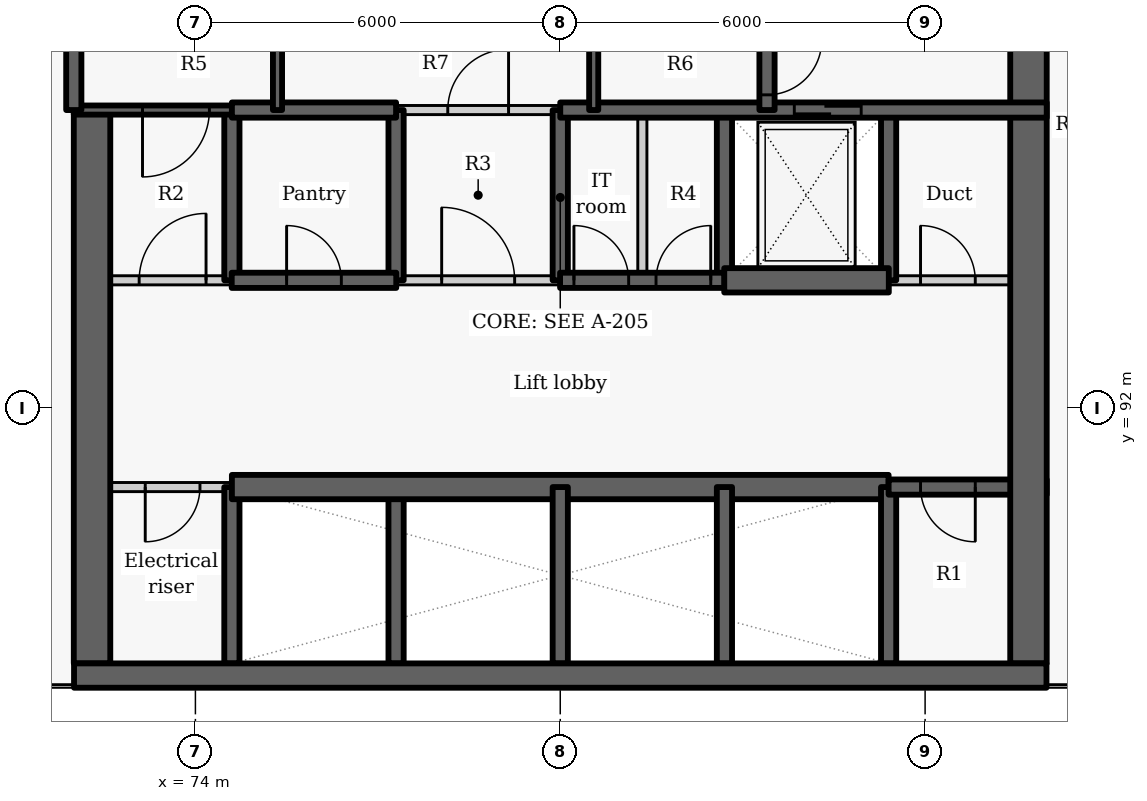
"""IFC4 building model, lengths in metres.
Left out: names, types, materials, properties, quantities, classifications, styles, units other than length and angle.
Written with IfcOpenShell. Run it as: python <this file> out.ifc"""

import sys

from ifc_helpers import new_model, si_unit, direction, frame, frame_2d, origin, place, context, subcontext, project, spatial, rectangle, extrude, element, fill, save


model = new_model("IFC4")
c1 = context("Model", 3, precision=1e-05, world=origin(), true_north=direction((0.0, 1.0)))
c2 = subcontext(c1, "Body", "Model", "MODEL_VIEW")
j1 = project(units=[si_unit("LENGTHUNIT", "METRE"), si_unit("PLANEANGLEUNIT", "RADIAN")], contexts=[c1])
p1 = place(None, origin())
s1 = spatial("IfcSite", under=j1, at=p1, CompositionType="ELEMENT")
p2 = place(p1, origin())
s2 = spatial("IfcBuilding", under=s1, at=p2, CompositionType="ELEMENT")
p3 = place(p2, frame((0.0, 0.0, 19.8)))
s3 = spatial("IfcBuildingStorey", under=s2, at=p3, CompositionType="ELEMENT", Elevation=19.8)
p4 = place(p3, frame((74.6, 87.8, -0.3), z_axis=(0.0, 0.0, 1.0), x_axis=(0.0, 1.0, 0.0)))
e1 = element("IfcWall", 1, at=p4, inside=s3, PredefinedType="SHEAR", context=c2, shape_type="SweptSolid", body=[
    extrude(rectangle(XDim=2.9, YDim=0.25, at=frame_2d((1.45, 0.0))), origin(), (0.0, 0.0, 1.0), 4.2),
])
p5 = place(p3, frame((74.6, 94.1, -0.3), z_axis=(0.0, 0.0, 1.0), x_axis=(0.0, 1.0, 0.0)))
e2 = element("IfcWall", 2, at=p5, inside=s3, PredefinedType="SHEAR", context=c2, shape_type="SweptSolid", body=[
    extrude(rectangle(XDim=2.8, YDim=0.25, at=frame_2d((1.4, 0.0))), origin(), (0.0, 0.0, 1.0), 4.2),
])
p6 = place(p3, frame((74.6, 90.7, 0.0), z_axis=(0.0, 0.0, 1.0), x_axis=(-1.0, 0.0, 0.0)))
e3 = element("IfcWall", 3, at=p6, inside=s3, PredefinedType="PARTITIONING", context=c2, shape_type="SweptSolid", body=[
    extrude(rectangle(XDim=2.6, YDim=0.15, at=frame_2d((1.3, 0.0))), origin(), (0.0, 0.0, 1.0), 3.9),
])
p7 = place(p6, frame((0.525, 0.0, 0.0)))
e4 = element("IfcOpeningElement", 4, at=p7, cuts=e3, PredefinedType="OPENING", context=c2, shape_type="SweptSolid", body=[
    extrude(rectangle(XDim=0.9, YDim=2.1, at=frame_2d((0.45, 1.05))), frame((0.0, 0.085, 0.0), z_axis=(0.0, -1.0, 0.0), x_axis=(1.0, 0.0, 0.0)), (0.0, 0.0, 1.0), 0.17),
])
p8 = place(p3, frame((72.3, 87.8, -0.3), z_axis=(0.0, 0.0, 1.0), x_axis=(0.0, 1.0, 0.0)))
e5 = element("IfcWall", 5, at=p8, inside=s3, PredefinedType="SHEAR", context=c2, shape_type="SweptSolid", body=[
    extrude(rectangle(XDim=9.1, YDim=0.6, at=frame_2d((4.55, 0.0))), origin(), (0.0, 0.0, 1.0), 4.2),
])
p9 = place(p3, frame((77.3, 87.8, -0.3), z_axis=(0.0, 0.0, 1.0), x_axis=(0.0, 1.0, 0.0)))
e6 = element("IfcWall", 6, at=p9, inside=s3, PredefinedType="SHEAR", context=c2, shape_type="SweptSolid", body=[
    extrude(rectangle(XDim=2.9, YDim=0.25, at=frame_2d((1.45, 0.0))), origin(), (0.0, 0.0, 1.0), 4.2),
])
p10 = place(p3, frame((77.3, 94.1, -0.3), z_axis=(0.0, 0.0, 1.0), x_axis=(0.0, 1.0, 0.0)))
e7 = element("IfcWall", 7, at=p10, inside=s3, PredefinedType="SHEAR", context=c2, shape_type="SweptSolid", body=[
    extrude(rectangle(XDim=2.8, YDim=0.25, at=frame_2d((1.4, 0.0))), origin(), (0.0, 0.0, 1.0), 4.2),
])
p11 = place(p3, frame((74.6, 90.7, -0.3), z_axis=(0.0, 0.0, 1.0), x_axis=(1.0, 0.0, 0.0)))
e8 = element("IfcWall", 8, at=p11, inside=s3, PredefinedType="SHEAR", context=c2, shape_type="SweptSolid", body=[
    extrude(rectangle(XDim=10.8, YDim=0.4, at=frame_2d((5.4, 0.0))), origin(), (0.0, 0.0, 1.0), 4.2),
])
p12 = place(p3, frame((80.0, 87.8, -0.3), z_axis=(0.0, 0.0, 1.0), x_axis=(0.0, 1.0, 0.0)))
e9 = element("IfcWall", 9, at=p12, inside=s3, PredefinedType="SHEAR", context=c2, shape_type="SweptSolid", body=[
    extrude(rectangle(XDim=2.9, YDim=0.25, at=frame_2d((1.45, 0.0))), origin(), (0.0, 0.0, 1.0), 4.2),
])
p13 = place(p3, frame((80.0, 94.1, -0.3), z_axis=(0.0, 0.0, 1.0), x_axis=(0.0, 1.0, 0.0)))
e10 = element("IfcWall", 10, at=p13, inside=s3, PredefinedType="SHEAR", context=c2, shape_type="SweptSolid", body=[
    extrude(rectangle(XDim=2.8, YDim=0.25, at=frame_2d((1.4, 0.0))), origin(), (0.0, 0.0, 1.0), 4.2),
])
p14 = place(p3, frame((82.7, 87.8, -0.3), z_axis=(0.0, 0.0, 1.0), x_axis=(0.0, 1.0, 0.0)))
e11 = element("IfcWall", 11, at=p14, inside=s3, PredefinedType="SHEAR", context=c2, shape_type="SweptSolid", body=[
    extrude(rectangle(XDim=2.9, YDim=0.25, at=frame_2d((1.45, 0.0))), origin(), (0.0, 0.0, 1.0), 4.2),
])
p15 = place(p3, frame((82.7, 94.1, -0.3), z_axis=(0.0, 0.0, 1.0), x_axis=(0.0, 1.0, 0.0)))
e12 = element("IfcWall", 12, at=p15, inside=s3, PredefinedType="SHEAR", context=c2, shape_type="SweptSolid", body=[
    extrude(rectangle(XDim=2.8, YDim=0.25, at=frame_2d((1.4, 0.0))), origin(), (0.0, 0.0, 1.0), 4.2),
])
p16 = place(p3, frame((85.4, 87.8, -0.3), z_axis=(0.0, 0.0, 1.0), x_axis=(0.0, 1.0, 0.0)))
e13 = element("IfcWall", 13, at=p16, inside=s3, PredefinedType="SHEAR", context=c2, shape_type="SweptSolid", body=[
    extrude(rectangle(XDim=2.9, YDim=0.25, at=frame_2d((1.45, 0.0))), origin(), (0.0, 0.0, 1.0), 4.2),
])
p17 = place(p3, frame((85.4, 94.1, -0.3), z_axis=(0.0, 0.0, 1.0), x_axis=(0.0, 1.0, 0.0)))
e14 = element("IfcWall", 14, at=p17, inside=s3, PredefinedType="SHEAR", context=c2, shape_type="SweptSolid", body=[
    extrude(rectangle(XDim=2.8, YDim=0.25, at=frame_2d((1.4, 0.0))), origin(), (0.0, 0.0, 1.0), 4.2),
])
p18 = place(p3, frame((88.0, 90.7, -0.3), z_axis=(0.0, 0.0, 1.0), x_axis=(-1.0, 0.0, 0.0)))
e15 = element("IfcWall", 15, at=p18, inside=s3, PredefinedType="SHEAR", context=c2, shape_type="SweptSolid", body=[
    extrude(rectangle(XDim=2.6, YDim=0.25, at=frame_2d((1.3, 0.0))), origin(), (0.0, 0.0, 1.0), 4.2),
])
p19 = place(p18, frame((1.175, 0.0, 0.3)))
e16 = element("IfcOpeningElement", 16, at=p19, cuts=e15, PredefinedType="OPENING", context=c2, shape_type="SweptSolid", body=[
    extrude(rectangle(XDim=0.9, YDim=2.1, at=frame_2d((0.45, 1.05))), frame((0.0, 0.135, 0.0), z_axis=(0.0, -1.0, 0.0), x_axis=(1.0, 0.0, 0.0)), (0.0, 0.0, 1.0), 0.27),
])
p20 = place(p3, frame((87.7, 103.4, -0.3), z_axis=(0.0, 0.0, 1.0), x_axis=(0.0, -1.0, 0.0)))
e17 = element("IfcWall", 17, at=p20, inside=s3, PredefinedType="SHEAR", context=c2, shape_type="SweptSolid", body=[
    extrude(rectangle(XDim=15.6, YDim=0.6, at=frame_2d((7.8, 0.0))), origin(), (0.0, 0.0, 1.0), 4.2),
])
p21 = place(p20, frame((2.7, 0.0, 0.3)))
e18 = element("IfcOpeningElement", 18, at=p21, cuts=e17, PredefinedType="OPENING", context=c2, shape_type="SweptSolid", body=[
    extrude(rectangle(XDim=1.1, YDim=2.1, at=frame_2d((0.55, 1.05))), frame((0.0, 0.31, 0.0), z_axis=(0.0, -1.0, 0.0), x_axis=(1.0, 0.0, 0.0)), (0.0, 0.0, 1.0), 0.62),
])
p22 = place(p3, frame((72.0, 94.1, 0.0), z_axis=(0.0, 0.0, 1.0), x_axis=(1.0, 0.0, 0.0)))
e19 = element("IfcWall", 19, at=p22, inside=s3, PredefinedType="PARTITIONING", context=c2, shape_type="SweptSolid", body=[
    extrude(rectangle(XDim=2.603, YDim=0.15, at=frame_2d((1.302, 0.0))), origin(), (0.0, 0.0, 1.0), 3.9),
])
p23 = place(p22, frame((1.075, 0.0, 0.0)))
e20 = element("IfcOpeningElement", 20, at=p23, cuts=e19, PredefinedType="OPENING", context=c2, shape_type="SweptSolid", body=[
    extrude(rectangle(XDim=1.1, YDim=2.1, at=frame_2d((0.55, 1.05))), frame((0.0, 0.085, 0.0), z_axis=(0.0, -1.0, 0.0), x_axis=(1.0, 0.0, 0.0)), (0.0, 0.0, 1.0), 0.17),
])
p24 = place(p3, frame((77.297, 94.1, 0.0), z_axis=(0.0, 0.0, 1.0), x_axis=(1.0, 0.0, 0.0)))
e21 = element("IfcWall", 21, at=p24, inside=s3, PredefinedType="PARTITIONING", context=c2, shape_type="SweptSolid", body=[
    extrude(rectangle(XDim=2.706, YDim=0.15, at=frame_2d((1.353, 0.0))), origin(), (0.0, 0.0, 1.0), 3.9),
])
p25 = place(p24, frame((0.753, 0.0, 0.0)))
e22 = element("IfcOpeningElement", 22, at=p25, cuts=e21, PredefinedType="OPENING", context=c2, shape_type="SweptSolid", body=[
    extrude(rectangle(XDim=1.2, YDim=2.1, at=frame_2d((0.6, 1.05))), frame((0.0, 0.085, 0.0), z_axis=(0.0, -1.0, 0.0), x_axis=(1.0, 0.0, 0.0)), (0.0, 0.0, 1.0), 0.17),
])
p26 = place(p3, frame((85.397, 94.1, 0.0), z_axis=(0.0, 0.0, 1.0), x_axis=(1.0, 0.0, 0.0)))
e23 = element("IfcWall", 23, at=p26, inside=s3, PredefinedType="PARTITIONING", context=c2, shape_type="SweptSolid", body=[
    extrude(rectangle(XDim=2.603, YDim=0.15, at=frame_2d((1.302, 0.0))), origin(), (0.0, 0.0, 1.0), 3.9),
])
p27 = place(p26, frame((0.528, 0.0, 0.0)))
e24 = element("IfcOpeningElement", 24, at=p27, cuts=e23, PredefinedType="OPENING", context=c2, shape_type="SweptSolid", body=[
    extrude(rectangle(XDim=0.9, YDim=2.1, at=frame_2d((0.45, 1.05))), frame((0.0, 0.085, 0.0), z_axis=(0.0, -1.0, 0.0), x_axis=(1.0, 0.0, 0.0)), (0.0, 0.0, 1.0), 0.17),
])
p28 = place(p3, frame((74.597, 94.1, -0.3), z_axis=(0.0, 0.0, 1.0), x_axis=(1.0, 0.0, 0.0)))
e25 = element("IfcWall", 25, at=p28, inside=s3, PredefinedType="SHEAR", context=c2, shape_type="SweptSolid", body=[
    extrude(rectangle(XDim=2.706, YDim=0.25, at=frame_2d((1.353, 0.0))), origin(), (0.0, 0.0, 1.0), 4.2),
])
p29 = place(p28, frame((0.903, 0.0, 0.3)))
e26 = element("IfcOpeningElement", 26, at=p29, cuts=e25, PredefinedType="OPENING", context=c2, shape_type="SweptSolid", body=[
    extrude(rectangle(XDim=0.9, YDim=2.1, at=frame_2d((0.45, 1.05))), frame((0.0, 0.135, 0.0), z_axis=(0.0, -1.0, 0.0), x_axis=(1.0, 0.0, 0.0)), (0.0, 0.0, 1.0), 0.27),
])
p30 = place(p3, frame((79.997, 94.1, -0.3), z_axis=(0.0, 0.0, 1.0), x_axis=(1.0, 0.0, 0.0)))
e27 = element("IfcWall", 27, at=p30, inside=s3, PredefinedType="SHEAR", context=c2, shape_type="SweptSolid", body=[
    extrude(rectangle(XDim=2.706, YDim=0.25, at=frame_2d((1.353, 0.0))), origin(), (0.0, 0.0, 1.0), 4.2),
])
p31 = place(p30, frame((0.228, 0.0, 0.3)))
e28 = element("IfcOpeningElement", 28, at=p31, cuts=e27, PredefinedType="OPENING", context=c2, shape_type="SweptSolid", body=[
    extrude(rectangle(XDim=0.9, YDim=2.1, at=frame_2d((0.45, 1.05))), frame((0.0, 0.135, 0.0), z_axis=(0.0, -1.0, 0.0), x_axis=(1.0, 0.0, 0.0)), (0.0, 0.0, 1.0), 0.27),
])
p32 = place(p30, frame((1.578, 0.0, 0.3)))
e29 = element("IfcOpeningElement", 29, at=p32, cuts=e27, PredefinedType="OPENING", context=c2, shape_type="SweptSolid", body=[
    extrude(rectangle(XDim=0.9, YDim=2.1, at=frame_2d((0.45, 1.05))), frame((0.0, 0.135, 0.0), z_axis=(0.0, -1.0, 0.0), x_axis=(1.0, 0.0, 0.0)), (0.0, 0.0, 1.0), 0.27),
])
p33 = place(p3, frame((82.697, 94.1, -0.3), z_axis=(0.0, 0.0, 1.0), x_axis=(1.0, 0.0, 0.0)))
e30 = element("IfcWall", 30, at=p33, inside=s3, PredefinedType="SHEAR", context=c2, shape_type="SweptSolid", body=[
    extrude(rectangle(XDim=2.706, YDim=0.4, at=frame_2d((1.353, 0.0))), origin(), (0.0, 0.0, 1.0), 4.2),
])
p34 = place(p3, frame((74.6, 96.9, -0.3), z_axis=(0.0, 0.0, 1.0), x_axis=(-1.0, 0.0, 0.0)))
e31 = element("IfcWall", 31, at=p34, inside=s3, PredefinedType="SHEAR", context=c2, shape_type="SweptSolid", body=[
    extrude(rectangle(XDim=2.6, YDim=0.15, at=frame_2d((1.3, 0.0))), origin(), (0.0, 0.0, 1.0), 4.2),
])
p35 = place(p34, frame((0.37, 0.0, 0.3)))
e32 = element("IfcOpeningElement", 32, at=p35, cuts=e31, PredefinedType="OPENING", context=c2, shape_type="SweptSolid", body=[
    extrude(rectangle(XDim=1.1, YDim=2.1, at=frame_2d((0.55, 1.05))), frame((0.0, 0.085, 0.0), z_axis=(0.0, -1.0, 0.0), x_axis=(1.0, 0.0, 0.0)), (0.0, 0.0, 1.0), 0.17),
])
p36 = place(p3, frame((74.6, 96.9, -0.3), z_axis=(0.0, 0.0, 1.0), x_axis=(1.0, 0.0, 0.0)))
e33 = element("IfcWall", 33, at=p36, inside=s3, PredefinedType="SHEAR", context=c2, shape_type="SweptSolid", body=[
    extrude(rectangle(XDim=2.7, YDim=0.25, at=frame_2d((1.35, 0.0))), origin(), (0.0, 0.0, 1.0), 4.2),
])
p37 = place(p3, frame((80.0, 96.9, -0.3), z_axis=(0.0, 0.0, 1.0), x_axis=(1.0, 0.0, 0.0)))
e34 = element("IfcWall", 34, at=p37, inside=s3, PredefinedType="SHEAR", context=c2, shape_type="SweptSolid", body=[
    extrude(rectangle(XDim=8.0, YDim=0.25, at=frame_2d((4.0, 0.0))), origin(), (0.0, 0.0, 1.0), 4.2),
])
p38 = place(p37, frame((3.849, 0.0, 0.3)))
e35 = element("IfcOpeningElement", 35, at=p38, cuts=e34, PredefinedType="OPENING", context=c2, shape_type="SweptSolid", body=[
    extrude(rectangle(XDim=1.1, YDim=2.1, at=frame_2d((0.55, 1.05))), frame((0.0, 0.135, 0.0), z_axis=(0.0, -1.0, 0.0), x_axis=(1.0, 0.0, 0.0)), (0.0, 0.0, 1.0), 0.27),
])
p39 = place(p3, frame((77.3, 96.9, 0.0), z_axis=(0.0, 0.0, 1.0), x_axis=(1.0, 0.0, 0.0)))
e36 = element("IfcWall", 36, at=p39, inside=s3, PredefinedType="PARTITIONING", context=c2, shape_type="SweptSolid", body=[
    extrude(rectangle(XDim=2.7, YDim=0.15, at=frame_2d((1.35, 0.0))), origin(), (0.0, 0.0, 1.0), 3.9),
])
p40 = place(p39, frame((0.85, 0.0, 0.0)))
e37 = element("IfcOpeningElement", 37, at=p40, cuts=e36, PredefinedType="OPENING", context=c2, shape_type="SweptSolid", body=[
    extrude(rectangle(XDim=1.0, YDim=2.1, at=frame_2d((0.5, 1.05))), frame((0.0, 0.085, 0.0), z_axis=(0.0, -1.0, 0.0), x_axis=(1.0, 0.0, 0.0)), (0.0, 0.0, 1.0), 0.17),
])
p41 = place(p3, frame((81.35, 94.1, 0.0), z_axis=(0.0, 0.0, 1.0), x_axis=(0.0, 1.0, 0.0)))
e38 = element("IfcWall", 38, at=p41, inside=s3, PredefinedType="PARTITIONING", context=c2, shape_type="SweptSolid", body=[
    extrude(rectangle(XDim=2.8, YDim=0.15, at=frame_2d((1.4, 0.0))), origin(), (0.0, 0.0, 1.0), 3.9),
])
p42 = place(p3, frame((75.35, 96.9, -0.3), z_axis=(0.0, 0.0, 1.0), x_axis=(0.0, 1.0, 0.0)))
e39 = element("IfcWall", 39, at=p42, inside=s3, PredefinedType="SHEAR", context=c2, shape_type="SweptSolid", body=[
    extrude(rectangle(XDim=1.503, YDim=0.15, at=frame_2d((0.751, 0.0))), origin(), (0.0, 0.0, 1.0), 4.2),
])
p43 = place(p3, frame((72.0, 96.9, -0.3), z_axis=(0.0, 0.0, 1.0), x_axis=(0.0, 1.0, 0.0)))
e40 = element("IfcWall", 40, at=p43, inside=s3, PredefinedType="SHEAR", context=c2, shape_type="SweptSolid", body=[
    extrude(rectangle(XDim=6.5, YDim=0.25, at=frame_2d((3.25, 0.0))), origin(), (0.0, 0.0, 1.0), 4.2),
])
p44 = place(p3, frame((83.4, 103.4, -0.3), z_axis=(0.0, 0.0, 1.0), x_axis=(0.0, -1.0, 0.0)))
e41 = element("IfcWall", 41, at=p44, inside=s3, PredefinedType="SHEAR", context=c2, shape_type="SweptSolid", body=[
    extrude(rectangle(XDim=6.5, YDim=0.25, at=frame_2d((3.25, 0.0))), origin(), (0.0, 0.0, 1.0), 4.2),
])
p45 = place(p44, frame((5.35, 0.0, 0.3)))
e42 = element("IfcOpeningElement", 42, at=p45, cuts=e41, PredefinedType="OPENING", context=c2, shape_type="SweptSolid", body=[
    extrude(rectangle(XDim=0.9, YDim=2.1, at=frame_2d((0.45, 1.05))), frame((0.0, 0.135, 0.0), z_axis=(0.0, -1.0, 0.0), x_axis=(1.0, 0.0, 0.0)), (0.0, 0.0, 1.0), 0.27),
])
p46 = place(p3, frame((80.55, 96.9, -0.3), z_axis=(0.0, 0.0, 1.0), x_axis=(0.0, 1.0, 0.0)))
e43 = element("IfcWall", 43, at=p46, inside=s3, PredefinedType="SHEAR", context=c2, shape_type="SweptSolid", body=[
    extrude(rectangle(XDim=1.503, YDim=0.15, at=frame_2d((0.751, 0.0))), origin(), (0.0, 0.0, 1.0), 4.2),
])
p47 = place(p3, frame((72.004, 87.6, -0.3), z_axis=(0.0, 0.0, 1.0), x_axis=(1.0, 0.0, 0.0)))
e44 = element("IfcWall", 44, at=p47, inside=s3, PredefinedType="SHEAR", context=c2, shape_type="SweptSolid", body=[
    extrude(rectangle(XDim=15.992, YDim=0.4, at=frame_2d((7.996, 0.0))), origin(), (0.0, 0.0, 1.0), 4.2),
])
p48 = place(p7, origin())
e45 = element("IfcDoor", 45, at=p48, inside=s3, OperationType="SINGLE_SWING_RIGHT", PredefinedType="DOOR", context=c2, shape_type="SweptSolid", body=[
    extrude(rectangle(XDim=0.9, YDim=2.1, at=frame_2d((0.45, 1.05))), frame((0.0, 0.025, 0.0), z_axis=(0.0, -1.0, 0.0), x_axis=(1.0, 0.0, 0.0)), (0.0, 0.0, 1.0), 0.05),
])
fill(e4, e45)
p49 = place(p19, origin())
e46 = element("IfcDoor", 46, at=p49, inside=s3, OperationType="SINGLE_SWING_LEFT", PredefinedType="DOOR", context=c2, shape_type="SweptSolid", body=[
    extrude(rectangle(XDim=0.9, YDim=2.1, at=frame_2d((0.45, 1.05))), frame((0.0, 0.025, 0.0), z_axis=(0.0, -1.0, 0.0), x_axis=(1.0, 0.0, 0.0)), (0.0, 0.0, 1.0), 0.05),
])
fill(e16, e46)
p50 = place(p23, origin())
e47 = element("IfcDoor", 47, at=p50, inside=s3, OperationType="SINGLE_SWING_RIGHT", PredefinedType="DOOR", context=c2, shape_type="SweptSolid", body=[
    extrude(rectangle(XDim=1.1, YDim=2.1, at=frame_2d((0.55, 1.05))), frame((0.0, 0.025, 0.0), z_axis=(0.0, -1.0, 0.0), x_axis=(1.0, 0.0, 0.0)), (0.0, 0.0, 1.0), 0.05),
])
fill(e20, e47)
p51 = place(p29, origin())
e48 = element("IfcDoor", 48, at=p51, inside=s3, OperationType="SINGLE_SWING_LEFT", PredefinedType="DOOR", context=c2, shape_type="SweptSolid", body=[
    extrude(rectangle(XDim=0.9, YDim=2.1, at=frame_2d((0.45, 1.05))), frame((0.0, 0.025, 0.0), z_axis=(0.0, -1.0, 0.0), x_axis=(1.0, 0.0, 0.0)), (0.0, 0.0, 1.0), 0.05),
])
fill(e26, e48)
p52 = place(p25, origin())
e49 = element("IfcDoor", 49, at=p52, inside=s3, OperationType="DOUBLE_DOOR_SINGLE_SWING", PredefinedType="DOOR", context=c2, shape_type="SweptSolid", body=[
    extrude(rectangle(XDim=1.2, YDim=2.1, at=frame_2d((0.6, 1.05))), frame((0.0, 0.025, 0.0), z_axis=(0.0, -1.0, 0.0), x_axis=(1.0, 0.0, 0.0)), (0.0, 0.0, 1.0), 0.05),
])
fill(e22, e49)
p53 = place(p31, origin())
e50 = element("IfcDoor", 50, at=p53, inside=s3, OperationType="SINGLE_SWING_LEFT", PredefinedType="DOOR", context=c2, shape_type="SweptSolid", body=[
    extrude(rectangle(XDim=0.9, YDim=2.1, at=frame_2d((0.45, 1.05))), frame((0.0, 0.025, 0.0), z_axis=(0.0, -1.0, 0.0), x_axis=(1.0, 0.0, 0.0)), (0.0, 0.0, 1.0), 0.05),
])
fill(e28, e50)
p54 = place(p32, origin())
e51 = element("IfcDoor", 51, at=p54, inside=s3, OperationType="SINGLE_SWING_RIGHT", PredefinedType="DOOR", context=c2, shape_type="SweptSolid", body=[
    extrude(rectangle(XDim=0.9, YDim=2.1, at=frame_2d((0.45, 1.05))), frame((0.0, 0.025, 0.0), z_axis=(0.0, -1.0, 0.0), x_axis=(1.0, 0.0, 0.0)), (0.0, 0.0, 1.0), 0.05),
])
fill(e29, e51)
p55 = place(p38, origin())
e52 = element("IfcDoor", 52, at=p55, inside=s3, OperationType="SLIDING_TO_LEFT", PredefinedType="DOOR", context=c2, shape_type="SweptSolid", body=[
    extrude(rectangle(XDim=1.1, YDim=2.1, at=frame_2d((0.55, 1.05))), frame((0.0, 0.025, 0.0), z_axis=(0.0, -1.0, 0.0), x_axis=(1.0, 0.0, 0.0)), (0.0, 0.0, 1.0), 0.05),
])
fill(e35, e52)
p56 = place(p27, origin())
e53 = element("IfcDoor", 53, at=p56, inside=s3, OperationType="SINGLE_SWING_LEFT", PredefinedType="DOOR", context=c2, shape_type="SweptSolid", body=[
    extrude(rectangle(XDim=0.9, YDim=2.1, at=frame_2d((0.45, 1.05))), frame((0.0, 0.025, 0.0), z_axis=(0.0, -1.0, 0.0), x_axis=(1.0, 0.0, 0.0)), (0.0, 0.0, 1.0), 0.05),
])
fill(e24, e53)
p57 = place(p40, origin())
e54 = element("IfcDoor", 54, at=p57, inside=s3, OperationType="SINGLE_SWING_RIGHT", PredefinedType="DOOR", context=c2, shape_type="SweptSolid", body=[
    extrude(rectangle(XDim=1.0, YDim=2.1, at=frame_2d((0.5, 1.05))), frame((0.0, 0.025, 0.0), z_axis=(0.0, -1.0, 0.0), x_axis=(1.0, 0.0, 0.0)), (0.0, 0.0, 1.0), 0.05),
])
fill(e37, e54)
p58 = place(p35, origin())
e55 = element("IfcDoor", 55, at=p58, inside=s3, OperationType="SINGLE_SWING_RIGHT", PredefinedType="DOOR", context=c2, shape_type="SweptSolid", body=[
    extrude(rectangle(XDim=1.1, YDim=2.1, at=frame_2d((0.55, 1.05))), frame((0.0, 0.025, 0.0), z_axis=(0.0, -1.0, 0.0), x_axis=(1.0, 0.0, 0.0)), (0.0, 0.0, 1.0), 0.05),
])
fill(e32, e55)
p59 = place(p45, origin())
e56 = element("IfcDoor", 56, at=p59, inside=s3, OperationType="SINGLE_SWING_LEFT", PredefinedType="DOOR", context=c2, shape_type="SweptSolid", body=[
    extrude(rectangle(XDim=0.9, YDim=2.1, at=frame_2d((0.45, 1.05))), frame((0.0, 0.025, 0.0), z_axis=(0.0, -1.0, 0.0), x_axis=(1.0, 0.0, 0.0)), (0.0, 0.0, 1.0), 0.05),
])
fill(e42, e56)
save(model, sys.argv[1])
